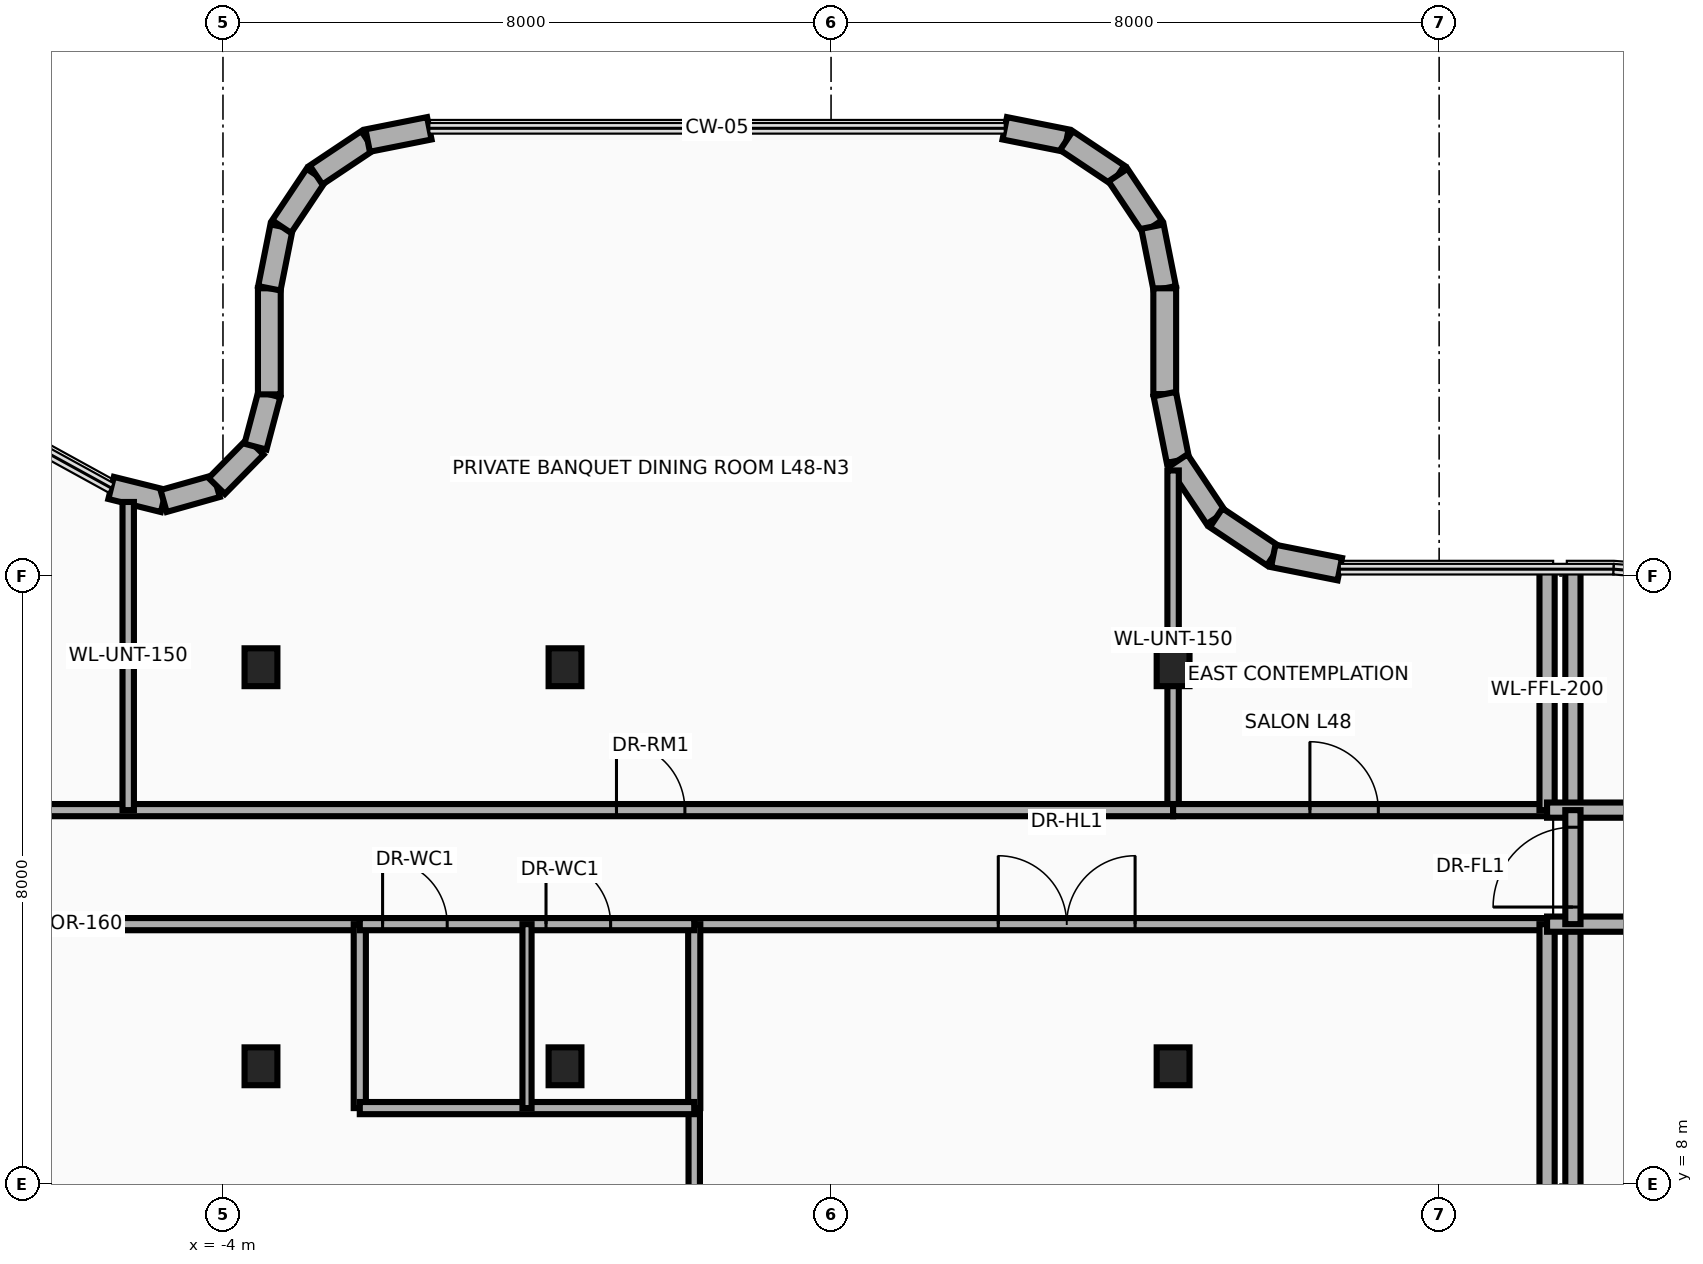
"""IFC4 building model, lengths in metres.
Left out: names, types, materials, properties, quantities, classifications, styles, units other than length and angle.
Written with IfcOpenShell. Run it as: python <this file> out.ifc"""

import sys

from ifc_helpers import new_model, si_unit, direction, frame, frame_2d, origin, origin_2d, place, context, subcontext, project, spatial, rectangle, i_section, extrude, source, transform, mapped, element, fill, save


model = new_model("IFC4")
c1 = context("Model", 3, precision=1e-05, world=origin(), true_north=direction((0.0, 1.0)))
c2 = subcontext(c1, "Body", "Model", "MODEL_VIEW")
j1 = project(units=[si_unit("LENGTHUNIT", "METRE"), si_unit("PLANEANGLEUNIT", "RADIAN")], contexts=[c1])
p1 = place(None, origin())
s1 = spatial("IfcSite", under=j1, at=p1, CompositionType="ELEMENT")
p2 = place(p1, origin())
s2 = spatial("IfcBuilding", under=s1, at=p2, CompositionType="ELEMENT")
p3 = place(p2, frame((0.0, 0.0, 188.4)))
s3 = spatial("IfcBuildingStorey", under=s2, at=p3, CompositionType="ELEMENT", Elevation=188.4)
m1 = source(origin(), c2, "Body", "SweptSolid", [
    extrude(i_section(OverallWidth=0.432, OverallDepth=0.498, WebThickness=0.056, FlangeThickness=0.089, at=origin_2d()), origin(), (0.0, 0.0, 1.0), 3.95),
])
for number, where, z_axis, x_axis in (
    (1, (-3.5, 9.55, 0.0), (0.0, 0.0, 1.0), (1.0, 0.0, 0.0)),
    (2, (-3.5, 14.8, 0.0), (0.0, 0.0, 1.0), (1.0, 0.0, 0.0)),
    (3, (8.5, 9.55, 0.0), (0.0, 0.0, 1.0), (1.0, 0.0, 0.0)),
    (4, (8.5, 14.8, 0.0), (0.0, 0.0, 1.0), (1.0, 0.0, 0.0)),
    (5, (0.5, 9.55, 0.0), (0.0, 0.0, 1.0), (1.0, 0.0, 0.0)),
    (6, (0.5, 14.8, 0.0), (0.0, 0.0, 1.0), (1.0, 0.0, 0.0)),
):
    element("IfcColumn", number, at=place(p3, frame(where, z_axis=z_axis, x_axis=x_axis)), inside=s3, PredefinedType="COLUMN", context=c2, shape_type="MappedRepresentation", body=[
        mapped(m1, transform((0.0, 0.0, 0.0), x_axis=(1.0, 0.0, 0.0), y_axis=(0.0, 1.0, 0.0), z_axis=(0.0, 0.0, 1.0), scale=1.0)),
    ])
p4 = place(p3, frame((-5.472, 17.159, 0.0), z_axis=(0.0, 0.0, 1.0), x_axis=(0.970564820059, -0.240840050789, 0.0)))
e7 = element("IfcWall", 7, at=p4, inside=s3, PredefinedType="SOLIDWALL", context=c2, shape_type="SweptSolid", body=[
    extrude(rectangle(XDim=0.712, YDim=0.3, at=frame_2d((0.356, 0.0))), origin(), (0.0, 0.0, 1.0), 3.63),
])
p5 = place(p3, frame((-4.781, 16.987, 0.0), z_axis=(0.0, 0.0, 1.0), x_axis=(0.962494705656, 0.271300463662, 0.0)))
e8 = element("IfcWall", 8, at=p5, inside=s3, PredefinedType="SOLIDWALL", context=c2, shape_type="SweptSolid", body=[
    extrude(rectangle(XDim=0.726, YDim=0.3, at=frame_2d((0.363, 0.0))), origin(), (0.0, 0.0, 1.0), 3.63),
])
p6 = place(p3, frame((-4.082, 17.184, 0.0), z_axis=(0.0, 0.0, 1.0), x_axis=(0.701538604215, 0.712631452293, 0.0)))
e9 = element("IfcWall", 9, at=p6, inside=s3, PredefinedType="SOLIDWALL", context=c2, shape_type="SweptSolid", body=[
    extrude(rectangle(XDim=0.726, YDim=0.3, at=frame_2d((0.363, 0.0))), origin(), (0.0, 0.0, 1.0), 2.615),
])
p7 = place(p3, frame((-3.573, 17.702, 0.0), z_axis=(0.0, 0.0, 1.0), x_axis=(0.256637481794, 0.966507735581, 0.0)))
e10 = element("IfcWall", 10, at=p7, inside=s3, PredefinedType="SOLIDWALL", context=c2, shape_type="SweptSolid", body=[
    extrude(rectangle(XDim=0.712, YDim=0.3, at=frame_2d((0.356, 0.0))), origin(), (0.0, 0.0, 1.0), 2.615),
])
p8 = place(p3, frame((-3.39, 18.39, 0.0), z_axis=(0.0, 0.0, 1.0), x_axis=(0.0, 1.0, 0.0)))
e11 = element("IfcWall", 11, at=p8, inside=s3, PredefinedType="SOLIDWALL", context=c2, shape_type="SweptSolid", body=[
    extrude(rectangle(XDim=1.396, YDim=0.3, at=frame_2d((0.698, 0.0))), origin(), (0.0, 0.0, 1.0), 2.615),
])
p9 = place(p3, frame((-3.39, 19.785, 0.0), z_axis=(0.0, 0.0, 1.0), x_axis=(0.195094354541, 0.980784478276, 0.0)))
e12 = element("IfcWall", 12, at=p9, inside=s3, PredefinedType="SOLIDWALL", context=c2, shape_type="SweptSolid", body=[
    extrude(rectangle(XDim=0.827, YDim=0.3, at=frame_2d((0.414, 0.0))), origin(), (0.0, 0.0, 1.0), 2.615),
])
p10 = place(p3, frame((-3.229, 20.596, 0.0), z_axis=(0.0, 0.0, 1.0), x_axis=(0.55545926088, 0.831543750805, 0.0)))
e13 = element("IfcWall", 13, at=p10, inside=s3, PredefinedType="SOLIDWALL", context=c2, shape_type="SweptSolid", body=[
    extrude(rectangle(XDim=0.816, YDim=0.3, at=frame_2d((0.408, 0.0))), origin(), (0.0, 0.0, 1.0), 2.615),
])
p11 = place(p3, frame((-2.775, 21.275, 0.0), z_axis=(0.0, 0.0, 1.0), x_axis=(0.831543750805, 0.55545926088, 0.0)))
e14 = element("IfcWall", 14, at=p11, inside=s3, PredefinedType="SOLIDWALL", context=c2, shape_type="SweptSolid", body=[
    extrude(rectangle(XDim=0.816, YDim=0.3, at=frame_2d((0.408, 0.0))), origin(), (0.0, 0.0, 1.0), 3.63),
])
for number, where, z_axis, x_axis in (
    (15, (-2.096, 21.729, 0.0), (0.0, 0.0, 1.0), (0.981, 0.195, 0.0)),
    (16, (6.285, 21.89, 0.0), (0.0, 0.0, 1.0), (0.981, -0.195, 0.0)),
):
    element("IfcWall", number, at=place(p3, frame(where, z_axis=z_axis, x_axis=x_axis)), inside=s3, PredefinedType="SOLIDWALL", context=c2, shape_type="SweptSolid", body=[
        extrude(rectangle(XDim=0.827, YDim=0.3, at=frame_2d((0.414, 0.0))), origin(), (0.0, 0.0, 1.0), 3.076),
    ])
p12 = place(p3, frame((7.096, 21.729, 0.0), z_axis=(0.0, 0.0, 1.0), x_axis=(0.831543750805, -0.55545926088, 0.0)))
e17 = element("IfcWall", 17, at=p12, inside=s3, PredefinedType="SOLIDWALL", context=c2, shape_type="SweptSolid", body=[
    extrude(rectangle(XDim=0.816, YDim=0.3, at=frame_2d((0.408, 0.0))), origin(), (0.0, 0.0, 1.0), 3.63),
])
p13 = place(p3, frame((7.775, 21.275, 0.0), z_axis=(0.0, 0.0, 1.0), x_axis=(0.55545926088, -0.831543750805, 0.0)))
e18 = element("IfcWall", 18, at=p13, inside=s3, PredefinedType="SOLIDWALL", context=c2, shape_type="SweptSolid", body=[
    extrude(rectangle(XDim=0.816, YDim=0.3, at=frame_2d((0.408, 0.0))), origin(), (0.0, 0.0, 1.0), 2.615),
])
p14 = place(p3, frame((8.229, 20.596, 0.0), z_axis=(0.0, 0.0, 1.0), x_axis=(0.195094354541, -0.980784478276, 0.0)))
e19 = element("IfcWall", 19, at=p14, inside=s3, PredefinedType="SOLIDWALL", context=c2, shape_type="SweptSolid", body=[
    extrude(rectangle(XDim=0.827, YDim=0.3, at=frame_2d((0.414, 0.0))), origin(), (0.0, 0.0, 1.0), 2.615),
])
p15 = place(p3, frame((8.39, 19.785, 0.0), z_axis=(0.0, 0.0, 1.0), x_axis=(0.0, -1.0, 0.0)))
e20 = element("IfcWall", 20, at=p15, inside=s3, PredefinedType="SOLIDWALL", context=c2, shape_type="SweptSolid", body=[
    extrude(rectangle(XDim=1.392, YDim=0.3, at=frame_2d((0.696, 0.0))), origin(), (0.0, 0.0, 1.0), 2.615),
])
p16 = place(p3, frame((8.39, 18.393, 0.0), z_axis=(0.0, 0.0, 1.0), x_axis=(0.195222179208, -0.980759043163, 0.0)))
e21 = element("IfcWall", 21, at=p16, inside=s3, PredefinedType="SOLIDWALL", context=c2, shape_type="SweptSolid", body=[
    extrude(rectangle(XDim=0.893, YDim=0.3, at=frame_2d((0.446, 0.0))), origin(), (0.0, 0.0, 1.0), 2.615),
])
for number, where, z_axis, x_axis in (
    (22, (8.564, 17.518, 0.0), (0.0, 0.0, 1.0), (0.555, -0.832, 0.0)),
    (23, (9.066, 16.766, 0.0), (0.0, 0.0, 1.0), (0.832, -0.555, 0.0)),
):
    element("IfcWall", number, at=place(p3, frame(where, z_axis=z_axis, x_axis=x_axis)), inside=s3, PredefinedType="SOLIDWALL", context=c2, shape_type="SweptSolid", body=[
        extrude(rectangle(XDim=0.904, YDim=0.3, at=frame_2d((0.452, 0.0))), origin(), (0.0, 0.0, 1.0), 2.615),
    ])
p17 = place(p3, frame((9.818, 16.264, 0.0), z_axis=(0.0, 0.0, 1.0), x_axis=(0.980800964186, -0.195011457743, 0.0)))
e24 = element("IfcWall", 24, at=p17, inside=s3, PredefinedType="SOLIDWALL", context=c2, shape_type="SweptSolid", body=[
    extrude(rectangle(XDim=0.893, YDim=0.3, at=frame_2d((0.446, 0.0))), origin(), (0.0, 0.0, 1.0), 3.63),
])
p18 = place(p3, frame((8.5, 12.92, 0.0), z_axis=(0.0, 0.0, 1.0), x_axis=(0.0, 1.0, 0.0)))
e25 = element("IfcWall", 25, at=p18, inside=s3, PredefinedType="PARTITIONING", context=c2, shape_type="SweptSolid", body=[
    extrude(rectangle(XDim=4.469, YDim=0.15, at=frame_2d((2.234, 0.0))), origin(), (0.0, 0.0, 1.0), 2.615),
])
p19 = place(p3, frame((-28.25, 12.92, 0.0), z_axis=(0.0, 0.0, 1.0), x_axis=(1.0, 0.0, 0.0)))
e26 = element("IfcWall", 26, at=p19, inside=s3, PredefinedType="PARTITIONING", context=c2, shape_type="SweptSolid", body=[
    extrude(rectangle(XDim=36.75, YDim=0.16, at=frame_2d((18.375, 0.0))), origin(), (0.0, 0.0, 1.0), 2.615),
])
p20 = place(p19, frame((4.178, 0.0, 0.0)))
e27 = element("IfcOpeningElement", 27, at=p20, cuts=e26, PredefinedType="OPENING", context=c2, shape_type="SweptSolid", body=[
    extrude(rectangle(XDim=0.9, YDim=2.1, at=frame_2d((0.45, 1.05))), frame((0.0, 0.095, 0.0), z_axis=(0.0, -1.0, 0.0), x_axis=(1.0, 0.0, 0.0)), (0.0, 0.0, 1.0), 0.19),
])
p21 = place(p19, frame((15.68, 0.0, 0.0)))
e28 = element("IfcOpeningElement", 28, at=p21, cuts=e26, PredefinedType="OPENING", context=c2, shape_type="SweptSolid", body=[
    extrude(rectangle(XDim=0.9, YDim=2.1, at=frame_2d((0.45, 1.05))), frame((0.0, 0.095, 0.0), z_axis=(0.0, -1.0, 0.0), x_axis=(1.0, 0.0, 0.0)), (0.0, 0.0, 1.0), 0.19),
])
p22 = place(p19, frame((29.427, 0.0, 0.0)))
e29 = element("IfcOpeningElement", 29, at=p22, cuts=e26, PredefinedType="OPENING", context=c2, shape_type="SweptSolid", body=[
    extrude(rectangle(XDim=0.9, YDim=2.1, at=frame_2d((0.45, 1.05))), frame((0.0, 0.095, 0.0), z_axis=(0.0, -1.0, 0.0), x_axis=(1.0, 0.0, 0.0)), (0.0, 0.0, 1.0), 0.19),
])
p23 = place(p3, frame((-5.247, 12.92, 0.0), z_axis=(0.0, 0.0, 1.0), x_axis=(0.0, 1.0, 0.0)))
e30 = element("IfcWall", 30, at=p23, inside=s3, PredefinedType="PARTITIONING", context=c2, shape_type="SweptSolid", body=[
    extrude(rectangle(XDim=4.054, YDim=0.15, at=frame_2d((2.027, 0.0))), origin(), (0.0, 0.0, 1.0), 2.415),
])
p24 = place(p3, frame((-10.05, 11.42, 0.0), z_axis=(0.0, 0.0, 1.0), x_axis=(1.0, 0.0, 0.0)))
e31 = element("IfcWall", 31, at=p24, inside=s3, PredefinedType="PARTITIONING", context=c2, shape_type="SweptSolid", body=[
    extrude(rectangle(XDim=7.85, YDim=0.16, at=frame_2d((3.925, 0.0))), origin(), (0.0, 0.0, 1.0), 2.615),
])
p25 = place(p3, frame((2.2, 11.42, 0.0), z_axis=(0.0, 0.0, 1.0), x_axis=(1.0, 0.0, 0.0)))
e32 = element("IfcWall", 32, at=p25, inside=s3, PredefinedType="PARTITIONING", context=c2, shape_type="SweptSolid", body=[
    extrude(rectangle(XDim=11.22, YDim=0.16, at=frame_2d((5.61, 0.0))), origin(), (0.0, 0.0, 1.0), 2.615),
])
p26 = place(p25, frame((4.0, 0.0, 0.0)))
e33 = element("IfcOpeningElement", 33, at=p26, cuts=e32, PredefinedType="OPENING", context=c2, shape_type="SweptSolid", body=[
    extrude(rectangle(XDim=1.8, YDim=2.15, at=frame_2d((0.9, 1.075))), frame((0.0, 0.095, 0.0), z_axis=(0.0, -1.0, 0.0), x_axis=(1.0, 0.0, 0.0)), (0.0, 0.0, 1.0), 0.19),
])
for number, where, z_axis, x_axis in (
    (34, (13.42, -2.0, 0.0), (0.0, 0.0, 1.0), (0.0, 1.0, 0.0)),
    (35, (13.76, -2.0, 0.0), (0.0, 0.0, 1.0), (0.0, 1.0, 0.0)),
):
    element("IfcWall", number, at=place(p3, frame(where, z_axis=z_axis, x_axis=x_axis)), inside=s3, PredefinedType="PARTITIONING", context=c2, shape_type="SweptSolid", body=[
        extrude(rectangle(XDim=13.42, YDim=0.2, at=frame_2d((6.71, 0.0))), origin(), (0.0, 0.0, 1.0), 2.665),
    ])
p27 = place(p3, frame((2.2, -7.09, 0.0), z_axis=(0.0, 0.0, 1.0), x_axis=(0.0, 1.0, 0.0)))
e36 = element("IfcWall", 36, at=p27, inside=s3, PredefinedType="PARTITIONING", context=c2, shape_type="SweptSolid", body=[
    extrude(rectangle(XDim=16.09, YDim=0.15, at=frame_2d((8.045, 0.0))), origin(), (0.0, 0.0, 1.0), 2.665),
])
p28 = place(p27, frame((11.5, 0.0, 0.0)))
e37 = element("IfcOpeningElement", 37, at=p28, cuts=e36, PredefinedType="OPENING", context=c2, shape_type="SweptSolid", body=[
    extrude(rectangle(XDim=0.9, YDim=2.1, at=frame_2d((0.45, 1.05))), frame((0.0, 0.09, 0.0), z_axis=(0.0, -1.0, 0.0), x_axis=(1.0, 0.0, 0.0)), (0.0, 0.0, 1.0), 0.18),
])
for number, where, z_axis, x_axis in (
    (38, (-2.2, 9.0, 0.0), (0.0, 0.0, 1.0), (0.0, 1.0, 0.0)),
    (39, (2.2, 9.0, 0.0), (0.0, 0.0, 1.0), (0.0, 1.0, 0.0)),
):
    element("IfcWall", number, at=place(p3, frame(where, z_axis=z_axis, x_axis=x_axis)), inside=s3, PredefinedType="PARTITIONING", context=c2, shape_type="SweptSolid", body=[
        extrude(rectangle(XDim=2.42, YDim=0.16, at=frame_2d((1.21, 0.0))), origin(), (0.0, 0.0, 1.0), 2.665),
    ])
p29 = place(p3, frame((-2.2, 9.0, 0.0), z_axis=(0.0, 0.0, 1.0), x_axis=(1.0, 0.0, 0.0)))
e40 = element("IfcWall", 40, at=p29, inside=s3, PredefinedType="PARTITIONING", context=c2, shape_type="SweptSolid", body=[
    extrude(rectangle(XDim=4.4, YDim=0.16, at=frame_2d((2.2, 0.0))), origin(), (0.0, 0.0, 1.0), 3.63),
])
p30 = place(p3, frame((-2.2, 11.42, 0.0), z_axis=(0.0, 0.0, 1.0), x_axis=(1.0, 0.0, 0.0)))
e41 = element("IfcWall", 41, at=p30, inside=s3, PredefinedType="PARTITIONING", context=c2, shape_type="SweptSolid", body=[
    extrude(rectangle(XDim=4.4, YDim=0.16, at=frame_2d((2.2, 0.0))), origin(), (0.0, 0.0, 1.0), 3.63),
])
p31 = place(p30, frame((0.3, 0.0, 0.0)))
e42 = element("IfcOpeningElement", 42, at=p31, cuts=e41, PredefinedType="OPENING", context=c2, shape_type="SweptSolid", body=[
    extrude(rectangle(XDim=0.85, YDim=2.1, at=frame_2d((0.425, 1.05))), frame((0.0, 0.095, 0.0), z_axis=(0.0, -1.0, 0.0), x_axis=(1.0, 0.0, 0.0)), (0.0, 0.0, 1.0), 0.19),
])
p32 = place(p30, frame((2.45, 0.0, 0.0)))
e43 = element("IfcOpeningElement", 43, at=p32, cuts=e41, PredefinedType="OPENING", context=c2, shape_type="SweptSolid", body=[
    extrude(rectangle(XDim=0.85, YDim=2.1, at=frame_2d((0.425, 1.05))), frame((0.0, 0.095, 0.0), z_axis=(0.0, -1.0, 0.0), x_axis=(1.0, 0.0, 0.0)), (0.0, 0.0, 1.0), 0.19),
])
p33 = place(p3, frame((0.0, 9.0, 0.0), z_axis=(0.0, 0.0, 1.0), x_axis=(0.0, 1.0, 0.0)))
e44 = element("IfcWall", 44, at=p33, inside=s3, PredefinedType="PARTITIONING", context=c2, shape_type="SweptSolid", body=[
    extrude(rectangle(XDim=2.42, YDim=0.12, at=frame_2d((1.21, 0.0))), origin(), (0.0, 0.0, 1.0), 2.665),
])
p34 = place(p3, frame((8.5, 12.92, 0.0), z_axis=(0.0, 0.0, 1.0), x_axis=(1.0, 0.0, 0.0)))
e45 = element("IfcWall", 45, at=p34, inside=s3, PredefinedType="PARTITIONING", context=c2, shape_type="SweptSolid", body=[
    extrude(rectangle(XDim=4.92, YDim=0.16, at=frame_2d((2.46, 0.0))), origin(), (0.0, 0.0, 1.0), 2.615),
])
p35 = place(p34, frame((1.8, 0.0, 0.0)))
e46 = element("IfcOpeningElement", 46, at=p35, cuts=e45, PredefinedType="OPENING", context=c2, shape_type="SweptSolid", body=[
    extrude(rectangle(XDim=0.9, YDim=2.1, at=frame_2d((0.45, 1.05))), frame((0.0, 0.095, 0.0), z_axis=(0.0, -1.0, 0.0), x_axis=(1.0, 0.0, 0.0)), (0.0, 0.0, 1.0), 0.19),
])
for number, where, z_axis, x_axis in (
    (47, (13.42, 12.92, 0.0), (0.0, 0.0, 1.0), (0.0, 1.0, 0.0)),
    (48, (13.76, 12.92, 0.0), (0.0, 0.0, 1.0), (0.0, 1.0, 0.0)),
):
    element("IfcWall", number, at=place(p3, frame(where, z_axis=z_axis, x_axis=x_axis)), inside=s3, PredefinedType="PARTITIONING", context=c2, shape_type="SweptSolid", body=[
        extrude(rectangle(XDim=3.17, YDim=0.2, at=frame_2d((1.585, 0.0))), origin(), (0.0, 0.0, 1.0), 2.665),
    ])
for number, where, z_axis, x_axis in (
    (49, (13.42, 12.92, 0.0), (0.0, 0.0, 1.0), (1.0, 0.0, 0.0)),
    (50, (13.42, 11.42, 0.0), (0.0, 0.0, 1.0), (1.0, 0.0, 0.0)),
):
    element("IfcWall", number, at=place(p3, frame(where, z_axis=z_axis, x_axis=x_axis)), inside=s3, PredefinedType="PARTITIONING", context=c2, shape_type="SweptSolid", body=[
        extrude(rectangle(XDim=1.98, YDim=0.2, at=frame_2d((0.99, 0.0))), origin(), (0.0, 0.0, 1.0), 3.004),
    ])
p36 = place(p3, frame((13.76, 11.42, 0.0), z_axis=(0.0, 0.0, 1.0), x_axis=(0.0, 1.0, 0.0)))
e51 = element("IfcWall", 51, at=p36, inside=s3, PredefinedType="PARTITIONING", context=c2, shape_type="SweptSolid", body=[
    extrude(rectangle(XDim=1.5, YDim=0.2, at=frame_2d((0.75, 0.0))), origin(), (0.0, 0.0, 1.0), 3.004),
])
p37 = place(p36, frame((0.225, 0.0, 0.0)))
e52 = element("IfcOpeningElement", 52, at=p37, cuts=e51, PredefinedType="OPENING", context=c2, shape_type="SweptSolid", body=[
    extrude(rectangle(XDim=1.05, YDim=2.15, at=frame_2d((0.525, 1.075))), frame((0.0, 0.115, 0.0), z_axis=(0.0, -1.0, 0.0), x_axis=(1.0, 0.0, 0.0)), (0.0, 0.0, 1.0), 0.23),
])
p38 = place(p22, origin())
e53 = element("IfcDoor", 53, at=p38, inside=s3, OperationType="SINGLE_SWING_RIGHT", PredefinedType="DOOR", context=c2, shape_type="SweptSolid", body=[
    extrude(rectangle(XDim=0.9, YDim=2.1, at=frame_2d((0.45, 1.05))), frame((0.0, 0.025, 0.0), z_axis=(0.0, -1.0, 0.0), x_axis=(1.0, 0.0, 0.0)), (0.0, 0.0, 1.0), 0.05),
])
fill(e29, e53)
p39 = place(p26, origin())
e54 = element("IfcDoor", 54, at=p39, inside=s3, OperationType="DOUBLE_DOOR_SINGLE_SWING", PredefinedType="DOOR", context=c2, shape_type="SweptSolid", body=[
    extrude(rectangle(XDim=1.8, YDim=2.15, at=frame_2d((0.9, 1.075))), frame((0.0, 0.025, 0.0), z_axis=(0.0, -1.0, 0.0), x_axis=(1.0, 0.0, 0.0)), (0.0, 0.0, 1.0), 0.05),
])
fill(e33, e54)
p40 = place(p31, origin())
e55 = element("IfcDoor", 55, at=p40, inside=s3, OperationType="SINGLE_SWING_RIGHT", PredefinedType="DOOR", context=c2, shape_type="SweptSolid", body=[
    extrude(rectangle(XDim=0.85, YDim=2.1, at=frame_2d((0.425, 1.05))), frame((0.0, 0.025, 0.0), z_axis=(0.0, -1.0, 0.0), x_axis=(1.0, 0.0, 0.0)), (0.0, 0.0, 1.0), 0.05),
])
fill(e42, e55)
p41 = place(p32, origin())
e56 = element("IfcDoor", 56, at=p41, inside=s3, OperationType="SINGLE_SWING_LEFT", PredefinedType="DOOR", context=c2, shape_type="SweptSolid", body=[
    extrude(rectangle(XDim=0.85, YDim=2.1, at=frame_2d((0.425, 1.05))), frame((0.0, 0.025, 0.0), z_axis=(0.0, -1.0, 0.0), x_axis=(1.0, 0.0, 0.0)), (0.0, 0.0, 1.0), 0.05),
])
fill(e43, e56)
p42 = place(p35, origin())
e57 = element("IfcDoor", 57, at=p42, inside=s3, OperationType="SINGLE_SWING_RIGHT", PredefinedType="DOOR", context=c2, shape_type="SweptSolid", body=[
    extrude(rectangle(XDim=0.9, YDim=2.1, at=frame_2d((0.45, 1.05))), frame((0.0, 0.025, 0.0), z_axis=(0.0, -1.0, 0.0), x_axis=(1.0, 0.0, 0.0)), (0.0, 0.0, 1.0), 0.05),
])
fill(e46, e57)
p43 = place(p37, origin())
e58 = element("IfcDoor", 58, at=p43, inside=s3, OperationType="SINGLE_SWING_LEFT", PredefinedType="DOOR", context=c2, shape_type="SweptSolid", body=[
    extrude(rectangle(XDim=1.05, YDim=2.15, at=frame_2d((0.525, 1.075))), frame((0.0, 0.025, 0.0), z_axis=(0.0, -1.0, 0.0), x_axis=(1.0, 0.0, 0.0)), (0.0, 0.0, 1.0), 0.05),
])
fill(e52, e58)
save(model, sys.argv[1])
